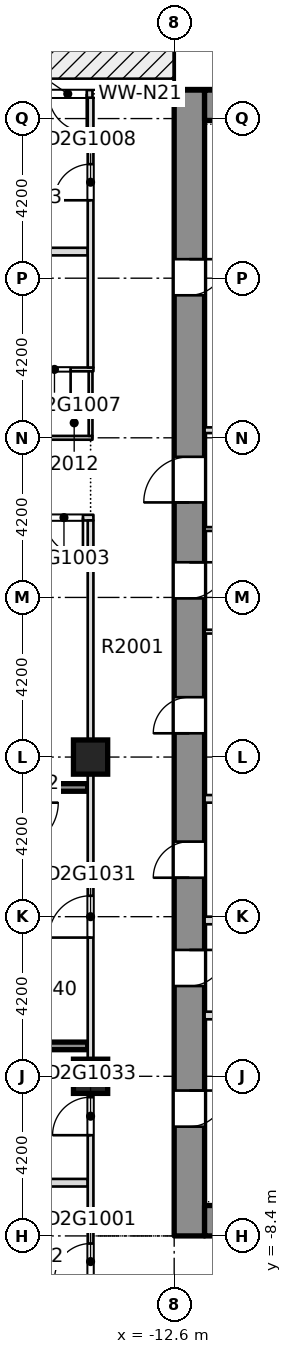
"""IFC4 building model, lengths in metres.
Left out: names, types, materials, properties, quantities, classifications, styles, units other than length and angle.
Written with IfcOpenShell. Run it as: python <this file> out.ifc"""

import sys

from ifc_helpers import new_model, si_unit, direction, frame, frame_2d, origin, origin_2d, place, context, subcontext, project, spatial, rectangle, extrude, element, fill, save


model = new_model("IFC4")
c1 = context("Model", 3, precision=1e-05, world=origin(), true_north=direction((0.0, 1.0)))
c2 = subcontext(c1, "Body", "Model", "MODEL_VIEW")
j1 = project(units=[si_unit("LENGTHUNIT", "METRE"), si_unit("PLANEANGLEUNIT", "RADIAN")], contexts=[c1])
p1 = place(None, origin())
s1 = spatial("IfcSite", under=j1, at=p1, CompositionType="ELEMENT")
p2 = place(p1, origin())
s2 = spatial("IfcBuilding", under=s1, at=p2, CompositionType="ELEMENT")
p3 = place(p2, frame((0.0, 0.0, 83.85)))
s3 = spatial("IfcBuildingStorey", under=s2, at=p3, CompositionType="ELEMENT", Elevation=83.85)
p4 = place(p3, frame((-12.2, -8.4, -0.32), z_axis=(0.0, 0.0, 1.0), x_axis=(0.0, 1.0, 0.0)))
e1 = element("IfcWall", 1, at=p4, inside=s3, PredefinedType="SHEAR", context=c2, shape_type="SweptSolid", body=[
    extrude(rectangle(XDim=30.15, YDim=0.8, at=frame_2d((15.075, 0.0))), origin(), (0.0, 0.0, 1.0), 3.45),
])
p5 = place(p4, frame((2.875, 0.0, 0.32)))
e2 = element("IfcOpeningElement", 2, at=p5, cuts=e1, PredefinedType="OPENING", context=c2, shape_type="SweptSolid", body=[
    extrude(rectangle(XDim=0.95, YDim=2.1, at=frame_2d((0.475, 1.05))), frame((0.0, 0.41, 0.0), z_axis=(0.0, -1.0, 0.0), x_axis=(1.0, 0.0, 0.0)), (0.0, 0.0, 1.0), 0.82),
])
p6 = place(p4, frame((6.575, 0.0, 0.32)))
e3 = element("IfcOpeningElement", 3, at=p6, cuts=e1, PredefinedType="OPENING", context=c2, shape_type="SweptSolid", body=[
    extrude(rectangle(XDim=0.95, YDim=2.1, at=frame_2d((0.475, 1.05))), frame((0.0, 0.41, 0.0), z_axis=(0.0, -1.0, 0.0), x_axis=(1.0, 0.0, 0.0)), (0.0, 0.0, 1.0), 0.82),
])
p7 = place(p4, frame((9.425, 0.0, 0.32)))
e4 = element("IfcOpeningElement", 4, at=p7, cuts=e1, PredefinedType="OPENING", context=c2, shape_type="SweptSolid", body=[
    extrude(rectangle(XDim=0.95, YDim=2.1, at=frame_2d((0.475, 1.05))), frame((0.0, 0.41, 0.0), z_axis=(0.0, -1.0, 0.0), x_axis=(1.0, 0.0, 0.0)), (0.0, 0.0, 1.0), 0.82),
])
p8 = place(p4, frame((13.225, 0.0, 0.32)))
e5 = element("IfcOpeningElement", 5, at=p8, cuts=e1, PredefinedType="OPENING", context=c2, shape_type="SweptSolid", body=[
    extrude(rectangle(XDim=0.95, YDim=2.1, at=frame_2d((0.475, 1.05))), frame((0.0, 0.41, 0.0), z_axis=(0.0, -1.0, 0.0), x_axis=(1.0, 0.0, 0.0)), (0.0, 0.0, 1.0), 0.82),
])
p9 = place(p4, frame((16.775, 0.0, 0.32)))
e6 = element("IfcOpeningElement", 6, at=p9, cuts=e1, PredefinedType="OPENING", context=c2, shape_type="SweptSolid", body=[
    extrude(rectangle(XDim=0.95, YDim=2.1, at=frame_2d((0.475, 1.05))), frame((0.0, 0.41, 0.0), z_axis=(0.0, -1.0, 0.0), x_axis=(1.0, 0.0, 0.0)), (0.0, 0.0, 1.0), 0.82),
])
p10 = place(p4, frame((24.75, 0.0, 0.32)))
e7 = element("IfcOpeningElement", 7, at=p10, cuts=e1, PredefinedType="OPENING", context=c2, shape_type="SweptSolid", body=[
    extrude(rectangle(XDim=0.95, YDim=2.1, at=frame_2d((0.475, 1.05))), frame((0.0, 0.41, 0.0), z_axis=(0.0, -1.0, 0.0), x_axis=(1.0, 0.0, 0.0)), (0.0, 0.0, 1.0), 0.82),
])
p11 = place(p4, frame((19.3, 0.0, 0.32)))
e8 = element("IfcOpeningElement", 8, at=p11, cuts=e1, PredefinedType="OPENING", context=c2, shape_type="SweptSolid", body=[
    extrude(rectangle(XDim=1.2, YDim=2.1, at=frame_2d((0.6, 1.05))), frame((0.0, 0.41, 0.0), z_axis=(0.0, -1.0, 0.0), x_axis=(1.0, 0.0, 0.0)), (0.0, 0.0, 1.0), 0.82),
])
p12 = place(p3, frame((-11.8, -8.0, -0.32), z_axis=(0.0, 0.0, 1.0), x_axis=(1.0, 0.0, 0.0)))
e9 = element("IfcWall", 9, at=p12, inside=s3, PredefinedType="SHEAR", context=c2, shape_type="SweptSolid", body=[
    extrude(rectangle(XDim=23.6, YDim=0.8, at=frame_2d((11.8, 0.0))), origin(), (0.0, 0.0, 1.0), 3.45),
])
p13 = place(p12, frame((7.05, 0.0, 0.32)))
e10 = element("IfcOpeningElement", 10, at=p13, cuts=e9, PredefinedType="OPENING", context=c2, shape_type="SweptSolid", body=[
    extrude(rectangle(XDim=1.8, YDim=2.1, at=frame_2d((0.9, 1.05))), frame((0.0, 0.41, 0.0), z_axis=(0.0, -1.0, 0.0), x_axis=(1.0, 0.0, 0.0)), (0.0, 0.0, 1.0), 0.82),
])
p14 = place(p12, frame((14.75, 0.0, 0.32)))
e11 = element("IfcOpeningElement", 11, at=p14, cuts=e9, PredefinedType="OPENING", context=c2, shape_type="SweptSolid", body=[
    extrude(rectangle(XDim=1.8, YDim=2.1, at=frame_2d((0.9, 1.05))), frame((0.0, 0.41, 0.0), z_axis=(0.0, -1.0, 0.0), x_axis=(1.0, 0.0, 0.0)), (0.0, 0.0, 1.0), 0.82),
])
p15 = place(p3, frame((-11.8, 21.35, -0.32), z_axis=(0.0, 0.0, 1.0), x_axis=(1.0, 0.0, 0.0)))
e12 = element("IfcWall", 12, at=p15, inside=s3, PredefinedType="SHEAR", context=c2, shape_type="SweptSolid", body=[
    extrude(rectangle(XDim=23.6, YDim=0.8, at=frame_2d((11.8, 0.0))), origin(), (0.0, 0.0, 1.0), 3.45),
])
for number, where, z_axis, x_axis in (
    (13, (-14.8, -4.2, -0.32), (0.0, 0.0, 1.0), (1.0, 0.0, 0.0)),
    (14, (-14.8, 4.2, -0.32), (0.0, 0.0, 1.0), (1.0, 0.0, 0.0)),
):
    element("IfcColumn", number, at=place(p3, frame(where, z_axis=z_axis, x_axis=x_axis)), inside=s3, PredefinedType="COLUMN", context=c2, shape_type="SweptSolid", body=[
        extrude(rectangle(XDim=0.9, YDim=0.9, at=origin_2d()), origin(), (0.0, 0.0, 1.0), 3.45),
    ])
p16 = place(p3, frame((-25.75, -7.0, 0.0), z_axis=(0.0, 0.0, 1.0), x_axis=(1.0, 0.0, 0.0)))
e15 = element("IfcWall", 15, at=p16, inside=s3, PredefinedType="PARTITIONING", context=c2, shape_type="SweptSolid", body=[
    extrude(rectangle(XDim=10.875, YDim=0.2, at=frame_2d((5.438, 0.0))), origin(), (0.0, 0.0, 1.0), 3.13),
])
p17 = place(p3, frame((-20.45, 3.4, 0.0), z_axis=(0.0, 0.0, 1.0), x_axis=(1.0, 0.0, 0.0)))
e16 = element("IfcWall", 16, at=p17, inside=s3, PredefinedType="SOLIDWALL", context=c2, shape_type="SweptSolid", body=[
    extrude(rectangle(XDim=5.575, YDim=0.2, at=frame_2d((2.788, 0.0))), origin(), (0.0, 0.0, 1.0), 3.13),
])
p18 = place(p3, frame((-25.75, 10.5, 0.0), z_axis=(0.0, 0.0, 1.0), x_axis=(1.0, 0.0, 0.0)))
e17 = element("IfcWall", 17, at=p18, inside=s3, PredefinedType="PARTITIONING", context=c2, shape_type="SweptSolid", body=[
    extrude(rectangle(XDim=11.025, YDim=0.15, at=frame_2d((5.512, 0.0))), origin(), (0.0, 0.0, 1.0), 3.13),
])
p19 = place(p18, frame((9.75, 0.0, 0.0)))
e18 = element("IfcOpeningElement", 18, at=p19, cuts=e17, PredefinedType="OPENING", context=c2, shape_type="SweptSolid", body=[
    extrude(rectangle(XDim=1.0, YDim=2.1, at=frame_2d((0.5, 1.05))), frame((0.0, 0.085, 0.0), z_axis=(0.0, -1.0, 0.0), x_axis=(1.0, 0.0, 0.0)), (0.0, 0.0, 1.0), 0.17),
])
p20 = place(p3, frame((-17.25, 12.6, 0.0), z_axis=(0.0, 0.0, 1.0), x_axis=(1.0, 0.0, 0.0)))
e19 = element("IfcWall", 19, at=p20, inside=s3, PredefinedType="PARTITIONING", context=c2, shape_type="SweptSolid", body=[
    extrude(rectangle(XDim=2.5, YDim=0.1, at=frame_2d((1.25, 0.0))), origin(), (0.0, 0.0, 1.0), 3.13),
])
p21 = place(p3, frame((-17.25, 14.4, 0.0), z_axis=(0.0, 0.0, 1.0), x_axis=(1.0, 0.0, 0.0)))
e20 = element("IfcWall", 20, at=p21, inside=s3, PredefinedType="PARTITIONING", context=c2, shape_type="SweptSolid", body=[
    extrude(rectangle(XDim=2.525, YDim=0.1, at=frame_2d((1.262, 0.0))), origin(), (0.0, 0.0, 1.0), 3.13),
])
p22 = place(p21, frame((1.075, 0.0, 0.0)))
e21 = element("IfcOpeningElement", 21, at=p22, cuts=e20, PredefinedType="OPENING", context=c2, shape_type="SweptSolid", body=[
    extrude(rectangle(XDim=0.85, YDim=2.1, at=frame_2d((0.425, 1.05))), frame((0.0, 0.06, 0.0), z_axis=(0.0, -1.0, 0.0), x_axis=(1.0, 0.0, 0.0)), (0.0, 0.0, 1.0), 0.12),
])
p23 = place(p3, frame((-17.35, 17.5, 0.0), z_axis=(0.0, 0.0, 1.0), x_axis=(1.0, 0.0, 0.0)))
e22 = element("IfcWall", 22, at=p23, inside=s3, PredefinedType="PARTITIONING", context=c2, shape_type="SweptSolid", body=[
    extrude(rectangle(XDim=2.475, YDim=0.2, at=frame_2d((1.238, 0.0))), origin(), (0.0, 0.0, 1.0), 3.13),
])
p24 = place(p3, frame((-14.8, -9.85, 0.0), z_axis=(0.0, 0.0, 1.0), x_axis=(0.0, 1.0, 0.0)))
e23 = element("IfcWall", 23, at=p24, inside=s3, PredefinedType="PARTITIONING", context=c2, shape_type="SweptSolid", body=[
    extrude(rectangle(XDim=20.275, YDim=0.15, at=frame_2d((10.138, 0.0))), origin(), (0.0, 0.0, 1.0), 3.13),
])
p25 = place(p24, frame((0.3, 0.0, 0.0)))
e24 = element("IfcOpeningElement", 24, at=p25, cuts=e23, PredefinedType="OPENING", context=c2, shape_type="SweptSolid", body=[
    extrude(rectangle(XDim=0.95, YDim=2.1, at=frame_2d((0.475, 1.05))), frame((0.0, 0.085, 0.0), z_axis=(0.0, -1.0, 0.0), x_axis=(1.0, 0.0, 0.0)), (0.0, 0.0, 1.0), 0.17),
])
p26 = place(p24, frame((9.3, 0.0, 0.0)))
e25 = element("IfcOpeningElement", 25, at=p26, cuts=e23, PredefinedType="OPENING", context=c2, shape_type="SweptSolid", body=[
    extrude(rectangle(XDim=1.1, YDim=2.1, at=frame_2d((0.55, 1.05))), frame((0.0, 0.085, 0.0), z_axis=(0.0, -1.0, 0.0), x_axis=(1.0, 0.0, 0.0)), (0.0, 0.0, 1.0), 0.17),
])
p27 = place(p24, frame((4.1, 0.0, 0.0)))
e26 = element("IfcOpeningElement", 26, at=p27, cuts=e23, PredefinedType="OPENING", context=c2, shape_type="SweptSolid", body=[
    extrude(rectangle(XDim=1.0, YDim=2.1, at=frame_2d((0.5, 1.05))), frame((0.0, 0.085, 0.0), z_axis=(0.0, -1.0, 0.0), x_axis=(1.0, 0.0, 0.0)), (0.0, 0.0, 1.0), 0.17),
])
p28 = place(p3, frame((-14.8, 12.65, 0.0), z_axis=(0.0, 0.0, 1.0), x_axis=(0.0, 1.0, 0.0)))
e27 = element("IfcWall", 27, at=p28, inside=s3, PredefinedType="PARTITIONING", context=c2, shape_type="SweptSolid", body=[
    extrude(rectangle(XDim=1.7, YDim=0.1, at=frame_2d((0.85, 0.0))), origin(), (0.0, 0.0, 1.0), 3.13),
])
p29 = place(p3, frame((-14.8, 14.45, 0.0), z_axis=(0.0, 0.0, 1.0), x_axis=(0.0, 1.0, 0.0)))
e28 = element("IfcWall", 28, at=p29, inside=s3, PredefinedType="PARTITIONING", context=c2, shape_type="SweptSolid", body=[
    extrude(rectangle(XDim=7.1, YDim=0.15, at=frame_2d((3.55, 0.0))), origin(), (0.0, 0.0, 1.0), 3.13),
])
p30 = place(p29, frame((4.4, 0.0, 0.0)))
e29 = element("IfcOpeningElement", 29, at=p30, cuts=e28, PredefinedType="OPENING", context=c2, shape_type="SweptSolid", body=[
    extrude(rectangle(XDim=0.95, YDim=2.1, at=frame_2d((0.475, 1.05))), frame((0.0, 0.085, 0.0), z_axis=(0.0, -1.0, 0.0), x_axis=(1.0, 0.0, 0.0)), (0.0, 0.0, 1.0), 0.17),
])
p31 = place(p3, frame((-12.6, 21.65, 0.0), z_axis=(0.0, 0.0, 1.0), x_axis=(-1.0, 0.0, 0.0)))
e30 = element("IfcWall", 30, at=p31, inside=s3, PredefinedType="STANDARD", context=c2, shape_type="SweptSolid", body=[
    extrude(rectangle(XDim=3.6, YDim=0.2, at=frame_2d((1.8, 0.0))), origin(), (0.0, 0.0, 1.0), 3.13),
])
p32 = place(p31, frame((0.35, 0.0, 0.2)))
e31 = element("IfcOpeningElement", 31, at=p32, cuts=e30, PredefinedType="OPENING", context=c2, shape_type="SweptSolid", body=[
    extrude(rectangle(XDim=1.8, YDim=2.65, at=frame_2d((0.9, 1.325))), frame((0.0, 0.11, 0.0), z_axis=(0.0, -1.0, 0.0), x_axis=(1.0, 0.0, 0.0)), (0.0, 0.0, 1.0), 0.22),
])
p33 = place(p31, frame((2.3, 0.0, 0.0)))
e32 = element("IfcOpeningElement", 32, at=p33, cuts=e30, PredefinedType="OPENING", context=c2, shape_type="SweptSolid", body=[
    extrude(rectangle(XDim=1.0, YDim=2.4, at=frame_2d((0.5, 1.2))), frame((0.0, 0.11, 0.0), z_axis=(0.0, -1.0, 0.0), x_axis=(1.0, 0.0, 0.0)), (0.0, 0.0, 1.0), 0.22),
])
for number, where, z_axis, x_axis in (
    (33, (-11.799, -2.6, 0.0), (0.0, 0.0, 1.0), (1.0, 0.0, 0.0)),
    (34, (-11.799, -0.1, 0.0), (0.0, 0.0, 1.0), (1.0, 0.0, 0.0)),
    (35, (-11.799, 3.1, 0.0), (0.0, 0.0, 1.0), (1.0, 0.0, 0.0)),
):
    element("IfcWall", number, at=place(p3, frame(where, z_axis=z_axis, x_axis=x_axis)), inside=s3, PredefinedType="PARTITIONING", context=c2, shape_type="SweptSolid", body=[
        extrude(rectangle(XDim=2.998, YDim=0.2, at=frame_2d((1.499, 0.0))), origin(), (0.0, 0.0, 1.0), 3.13),
    ])
for number, where, z_axis, x_axis in (
    (36, (-11.799, 7.5, 0.0), (0.0, 0.0, 1.0), (1.0, 0.0, 0.0)),
    (37, (-11.799, 10.2, 0.0), (0.0, 0.0, 1.0), (1.0, 0.0, 0.0)),
):
    element("IfcWall", number, at=place(p3, frame(where, z_axis=z_axis, x_axis=x_axis)), inside=s3, PredefinedType="PARTITIONING", context=c2, shape_type="SweptSolid", body=[
        extrude(rectangle(XDim=2.998, YDim=0.1, at=frame_2d((1.499, 0.0))), origin(), (0.0, 0.0, 1.0), 3.13),
    ])
p34 = place(p3, frame((-11.799, 12.8, 0.0), z_axis=(0.0, 0.0, 1.0), x_axis=(1.0, 0.0, 0.0)))
e38 = element("IfcWall", 38, at=p34, inside=s3, PredefinedType="PARTITIONING", context=c2, shape_type="SweptSolid", body=[
    extrude(rectangle(XDim=2.998, YDim=0.15, at=frame_2d((1.499, 0.0))), origin(), (0.0, 0.0, 1.0), 3.13),
])
p35 = place(p3, frame((-23.6, -3.4, 0.0), z_axis=(0.0, 0.0, 1.0), x_axis=(1.0, 0.0, 0.0)))
e39 = element("IfcWall", 39, at=p35, inside=s3, PredefinedType="SOLIDWALL", context=c2, shape_type="SweptSolid", body=[
    extrude(rectangle(XDim=8.725, YDim=0.2, at=frame_2d((4.363, 0.0))), origin(), (0.0, 0.0, 1.0), 3.13),
])
p36 = place(p25, origin())
e40 = element("IfcDoor", 40, at=p36, inside=s3, OperationType="SINGLE_SWING_LEFT", PredefinedType="DOOR", context=c2, shape_type="SweptSolid", body=[
    extrude(rectangle(XDim=0.95, YDim=2.1, at=frame_2d((0.475, 1.05))), frame((0.0, 0.025, 0.0), z_axis=(0.0, -1.0, 0.0), x_axis=(1.0, 0.0, 0.0)), (0.0, 0.0, 1.0), 0.05),
])
fill(e24, e40)
p37 = place(p19, origin())
e41 = element("IfcDoor", 41, at=p37, inside=s3, OperationType="SINGLE_SWING_RIGHT", PredefinedType="DOOR", context=c2, shape_type="SweptSolid", body=[
    extrude(rectangle(XDim=1.0, YDim=2.1, at=frame_2d((0.5, 1.05))), frame((0.0, 0.025, 0.0), z_axis=(0.0, -1.0, 0.0), x_axis=(1.0, 0.0, 0.0)), (0.0, 0.0, 1.0), 0.05),
])
fill(e18, e41)
p38 = place(p22, origin())
e42 = element("IfcDoor", 42, at=p38, inside=s3, OperationType="SINGLE_SWING_RIGHT", PredefinedType="DOOR", context=c2, shape_type="SweptSolid", body=[
    extrude(rectangle(XDim=0.85, YDim=2.1, at=frame_2d((0.425, 1.05))), frame((0.0, 0.025, 0.0), z_axis=(0.0, -1.0, 0.0), x_axis=(1.0, 0.0, 0.0)), (0.0, 0.0, 1.0), 0.05),
])
fill(e21, e42)
p39 = place(p30, origin())
e43 = element("IfcDoor", 43, at=p39, inside=s3, OperationType="SINGLE_SWING_LEFT", PredefinedType="DOOR", context=c2, shape_type="SweptSolid", body=[
    extrude(rectangle(XDim=0.95, YDim=2.1, at=frame_2d((0.475, 1.05))), frame((0.0, 0.025, 0.0), z_axis=(0.0, -1.0, 0.0), x_axis=(1.0, 0.0, 0.0)), (0.0, 0.0, 1.0), 0.05),
])
fill(e29, e43)
p40 = place(p26, origin())
e44 = element("IfcDoor", 44, at=p40, inside=s3, OperationType="SINGLE_SWING_RIGHT", PredefinedType="DOOR", context=c2, shape_type="SweptSolid", body=[
    extrude(rectangle(XDim=1.1, YDim=2.1, at=frame_2d((0.55, 1.05))), frame((0.0, 0.025, 0.0), z_axis=(0.0, -1.0, 0.0), x_axis=(1.0, 0.0, 0.0)), (0.0, 0.0, 1.0), 0.05),
])
fill(e25, e44)
p41 = place(p27, origin())
e45 = element("IfcDoor", 45, at=p41, inside=s3, OperationType="SINGLE_SWING_LEFT", PredefinedType="DOOR", context=c2, shape_type="SweptSolid", body=[
    extrude(rectangle(XDim=1.0, YDim=2.1, at=frame_2d((0.5, 1.05))), frame((0.0, 0.025, 0.0), z_axis=(0.0, -1.0, 0.0), x_axis=(1.0, 0.0, 0.0)), (0.0, 0.0, 1.0), 0.05),
])
fill(e26, e45)
p42 = place(p32, origin())
e46 = element("IfcWindow", 46, at=p42, inside=s3, PartitioningType="SINGLE_PANEL", PredefinedType="WINDOW", context=c2, shape_type="SweptSolid", body=[
    extrude(rectangle(XDim=1.8, YDim=2.65, at=frame_2d((0.9, 1.325))), frame((0.0, 0.03, 0.0), z_axis=(0.0, -1.0, 0.0), x_axis=(1.0, 0.0, 0.0)), (0.0, 0.0, 1.0), 0.06),
])
fill(e31, e46)
p43 = place(p33, origin())
e47 = element("IfcDoor", 47, at=p43, inside=s3, OperationType="SINGLE_SWING_LEFT", PredefinedType="DOOR", context=c2, shape_type="SweptSolid", body=[
    extrude(rectangle(XDim=1.0, YDim=2.4, at=frame_2d((0.5, 1.2))), frame((0.0, 0.025, 0.0), z_axis=(0.0, -1.0, 0.0), x_axis=(1.0, 0.0, 0.0)), (0.0, 0.0, 1.0), 0.05),
])
fill(e32, e47)
p44 = place(p5, origin())
e48 = element("IfcDoor", 48, at=p44, inside=s3, OperationType="SINGLE_SWING_LEFT", PredefinedType="DOOR", context=c2, shape_type="SweptSolid", body=[
    extrude(rectangle(XDim=0.95, YDim=2.1, at=frame_2d((0.475, 1.05))), frame((0.0, 0.025, 0.0), z_axis=(0.0, -1.0, 0.0), x_axis=(1.0, 0.0, 0.0)), (0.0, 0.0, 1.0), 0.05),
])
fill(e2, e48)
p45 = place(p6, origin())
e49 = element("IfcDoor", 49, at=p45, inside=s3, OperationType="SINGLE_SWING_LEFT", PredefinedType="DOOR", context=c2, shape_type="SweptSolid", body=[
    extrude(rectangle(XDim=0.95, YDim=2.1, at=frame_2d((0.475, 1.05))), frame((0.0, 0.025, 0.0), z_axis=(0.0, -1.0, 0.0), x_axis=(1.0, 0.0, 0.0)), (0.0, 0.0, 1.0), 0.05),
])
fill(e3, e49)
p46 = place(p7, origin())
e50 = element("IfcDoor", 50, at=p46, inside=s3, OperationType="SINGLE_SWING_LEFT", PredefinedType="DOOR", context=c2, shape_type="SweptSolid", body=[
    extrude(rectangle(XDim=0.95, YDim=2.1, at=frame_2d((0.475, 1.05))), frame((0.0, 0.025, 0.0), z_axis=(0.0, -1.0, 0.0), x_axis=(1.0, 0.0, 0.0)), (0.0, 0.0, 1.0), 0.05),
])
fill(e4, e50)
p47 = place(p8, origin())
e51 = element("IfcDoor", 51, at=p47, inside=s3, OperationType="SINGLE_SWING_LEFT", PredefinedType="DOOR", context=c2, shape_type="SweptSolid", body=[
    extrude(rectangle(XDim=0.95, YDim=2.1, at=frame_2d((0.475, 1.05))), frame((0.0, 0.025, 0.0), z_axis=(0.0, -1.0, 0.0), x_axis=(1.0, 0.0, 0.0)), (0.0, 0.0, 1.0), 0.05),
])
fill(e5, e51)
p48 = place(p9, origin())
e52 = element("IfcDoor", 52, at=p48, inside=s3, OperationType="SINGLE_SWING_LEFT", PredefinedType="DOOR", context=c2, shape_type="SweptSolid", body=[
    extrude(rectangle(XDim=0.95, YDim=2.1, at=frame_2d((0.475, 1.05))), frame((0.0, 0.025, 0.0), z_axis=(0.0, -1.0, 0.0), x_axis=(1.0, 0.0, 0.0)), (0.0, 0.0, 1.0), 0.05),
])
fill(e6, e52)
p49 = place(p10, origin())
e53 = element("IfcDoor", 53, at=p49, inside=s3, OperationType="SINGLE_SWING_LEFT", PredefinedType="DOOR", context=c2, shape_type="SweptSolid", body=[
    extrude(rectangle(XDim=0.95, YDim=2.1, at=frame_2d((0.475, 1.05))), frame((0.0, 0.025, 0.0), z_axis=(0.0, -1.0, 0.0), x_axis=(1.0, 0.0, 0.0)), (0.0, 0.0, 1.0), 0.05),
])
fill(e7, e53)
p50 = place(p11, origin())
e54 = element("IfcDoor", 54, at=p50, inside=s3, OperationType="SINGLE_SWING_LEFT", PredefinedType="DOOR", context=c2, shape_type="SweptSolid", body=[
    extrude(rectangle(XDim=1.2, YDim=2.1, at=frame_2d((0.6, 1.05))), frame((0.0, 0.025, 0.0), z_axis=(0.0, -1.0, 0.0), x_axis=(1.0, 0.0, 0.0)), (0.0, 0.0, 1.0), 0.05),
])
fill(e8, e54)
save(model, sys.argv[1])
